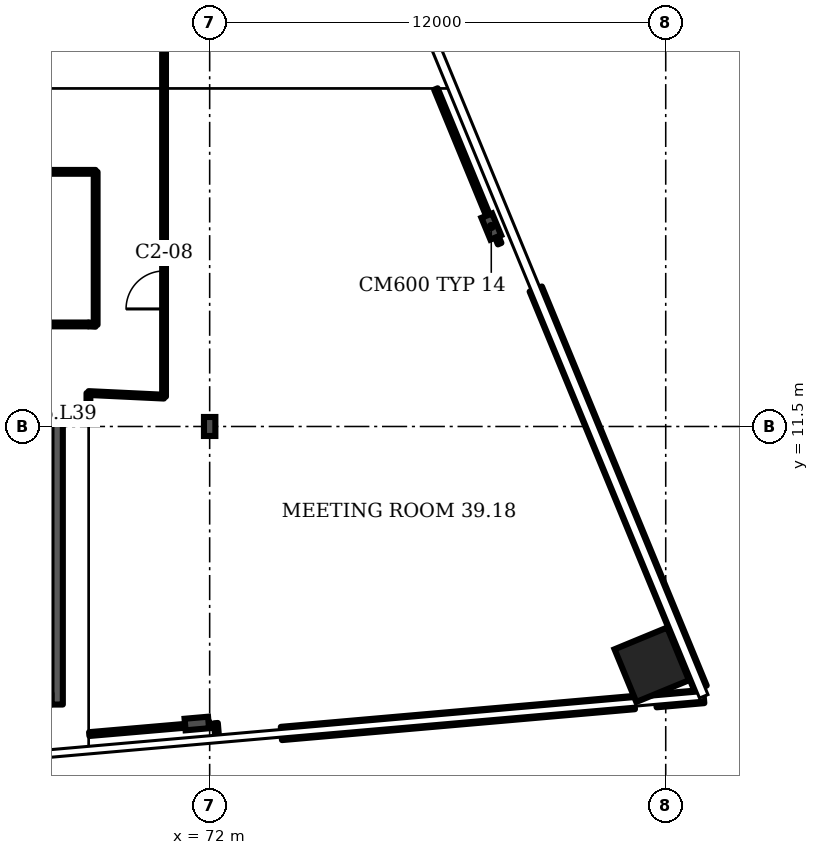
"""IFC4 building model, lengths in metres.
Left out: names, types, materials, properties, quantities, classifications, styles, units other than length and angle.
Written with IfcOpenShell. Run it as: python <this file> out.ifc"""

import sys

from ifc_helpers import new_model, si_unit, direction, frame, frame_2d, origin, origin_2d, place, context, subcontext, project, spatial, rectangle, i_section, extrude, element, fill, save


model = new_model("IFC4")
c1 = context("Model", 3, precision=1e-05, world=origin(), true_north=direction((0.0, 1.0)))
c2 = subcontext(c1, "Body", "Model", "MODEL_VIEW")
j1 = project(units=[si_unit("LENGTHUNIT", "METRE"), si_unit("PLANEANGLEUNIT", "RADIAN")], contexts=[c1])
p1 = place(None, origin())
s1 = spatial("IfcSite", under=j1, at=p1, CompositionType="ELEMENT")
p2 = place(p1, origin())
s2 = spatial("IfcBuilding", under=s1, at=p2, CompositionType="ELEMENT")
p3 = place(p2, frame((0.0, 0.0, 162.7)))
s3 = spatial("IfcBuildingStorey", under=s2, at=p3, CompositionType="ELEMENT", Elevation=162.7)
p4 = place(p3, frame((83.633, 5.231, 0.0), z_axis=(0.0, 0.0, 1.0), x_axis=(-0.381602, 0.924325, 0.0)))
e1 = element("IfcColumn", 1, at=p4, inside=s3, PredefinedType="COLUMN", context=c2, shape_type="SweptSolid", body=[
    extrude(rectangle(XDim=1.5, YDim=1.5, at=origin_2d()), origin(), (0.0, 0.0, 1.0), 3.6),
])
for number, where, z_axis, x_axis in (
    (2, (71.662, 3.685, 0.0), (0.0, 0.0, 1.0), (0.087, -0.996, 0.0)),
    (3, (79.41, 16.762, 0.0), (0.0, 0.0, 1.0), (0.924, 0.382, 0.0)),
):
    element("IfcColumn", number, at=place(p3, frame(where, z_axis=z_axis, x_axis=x_axis)), inside=s3, PredefinedType="COLUMN", context=c2, shape_type="SweptSolid", body=[
        extrude(i_section(OverallWidth=0.305, OverallDepth=0.62, WebThickness=0.021, FlangeThickness=0.04, FilletRadius=0.027, at=origin_2d()), origin(), (0.0, 0.0, 1.0), 3.6),
    ])
p5 = place(p3, frame((72.0, 11.5, 0.0), z_axis=(0.0, 0.0, 1.0), x_axis=(1.0, 0.0, 0.0)))
e4 = element("IfcColumn", 4, at=p5, inside=s3, PredefinedType="COLUMN", context=c2, shape_type="SweptSolid", body=[
    extrude(i_section(OverallWidth=0.3, OverallDepth=0.5, WebThickness=0.014, FlangeThickness=0.028, FilletRadius=0.027, at=origin_2d()), origin(), (0.0, 0.0, 1.0), 3.6),
])
p6 = place(p3, frame((73.887, 3.423, 0.0), z_axis=(0.0, 0.0, 1.0), x_axis=(0.996197, 0.087145, 0.0)))
e5 = element("IfcWall", 5, at=p6, inside=s3, PredefinedType="SOLIDWALL", context=c2, shape_type="SweptSolid", body=[
    extrude(rectangle(XDim=9.323, YDim=0.35, at=frame_2d((4.662, 0.0))), origin(), (0.0, 0.0, 1.0), 1.0),
])
p7 = place(p3, frame((83.745, 4.285, 0.0), z_axis=(0.0, 0.0, 1.0), x_axis=(0.996198, 0.087148, 0.0)))
e6 = element("IfcWall", 6, at=p7, inside=s3, PredefinedType="SOLIDWALL", context=c2, shape_type="SweptSolid", body=[
    extrude(rectangle(XDim=1.261, YDim=0.35, at=frame_2d((0.63, 0.0))), origin(), (0.0, 0.0, 1.0), 1.0),
])
p8 = place(p3, frame((84.916, 4.616, 0.0), z_axis=(0.0, 0.0, 1.0), x_axis=(-0.381598, 0.924328, 0.0)))
e7 = element("IfcWall", 7, at=p8, inside=s3, PredefinedType="SOLIDWALL", context=c2, shape_type="SweptSolid", body=[
    extrude(rectangle(XDim=11.361, YDim=0.35, at=frame_2d((5.68, 0.0))), origin(), (0.0, 0.0, 1.0), 1.0),
])
p9 = place(p3, frame((63.786, 11.834, 0.0), z_axis=(0.0, 0.0, 1.0), x_axis=(1.0, 0.0, 0.0)))
e8 = element("IfcWall", 8, at=p9, inside=s3, PredefinedType="SHEAR", context=c2, shape_type="SweptSolid", body=[
    extrude(rectangle(XDim=4.35, YDim=0.3, at=frame_2d((2.175, 0.0))), origin(), (0.0, 0.0, 1.0), 3.2),
])
p10 = place(p9, frame((1.575, 0.0, 0.0)))
e9 = element("IfcOpeningElement", 9, at=p10, cuts=e8, PredefinedType="OPENING", context=c2, shape_type="SweptSolid", body=[
    extrude(rectangle(XDim=1.2, YDim=2.1, at=frame_2d((0.6, 1.05))), frame((0.0, 0.16, 0.0), z_axis=(0.0, -1.0, 0.0), x_axis=(1.0, 0.0, 0.0)), (0.0, 0.0, 1.0), 0.32),
])
p11 = place(p3, frame((61.81, 14.185, 0.0), z_axis=(0.0, 0.0, 1.0), x_axis=(1.0, 0.0, 0.0)))
e10 = element("IfcWall", 10, at=p11, inside=s3, PredefinedType="PARTITIONING", context=c2, shape_type="SweptSolid", body=[
    extrude(rectangle(XDim=7.0, YDim=0.1, at=frame_2d((3.5, 0.0))), origin(), (0.0, 0.0, 1.0), 3.2),
])
p12 = place(p3, frame((63.905, 18.2, 0.0), z_axis=(0.0, 0.0, 1.0), x_axis=(1.0, 0.0, 0.0)))
e11 = element("IfcWall", 11, at=p12, inside=s3, PredefinedType="PARTITIONING", context=c2, shape_type="SweptSolid", body=[
    extrude(rectangle(XDim=5.095, YDim=0.1, at=frame_2d((2.547, 0.0))), origin(), (0.0, 0.0, 1.0), 3.2),
])
p13 = place(p3, frame((68.81, 12.004, 0.0), z_axis=(0.0, 0.0, 1.0), x_axis=(0.0, 1.0, 0.0)))
e12 = element("IfcWall", 12, at=p13, inside=s3, PredefinedType="PARTITIONING", context=c2, shape_type="SweptSolid", body=[
    extrude(rectangle(XDim=0.376, YDim=0.1, at=frame_2d((0.188, 0.0))), origin(), (0.0, 0.0, 1.0), 3.2),
])
p14 = place(p3, frame((68.831, 3.407, 0.0), z_axis=(0.0, 0.0, 1.0), x_axis=(0.996308, 0.085898, 0.0)))
e13 = element("IfcWall", 13, at=p14, inside=s3, PredefinedType="PARTITIONING", context=c2, shape_type="SweptSolid", body=[
    extrude(rectangle(XDim=3.18, YDim=0.1, at=frame_2d((1.59, 0.0))), origin(), (0.0, 0.0, 1.0), 2.58),
])
p15 = place(p3, frame((69.0, 14.175, 0.0), z_axis=(0.0, 0.0, 1.0), x_axis=(-0.99861, 0.052626, 0.0)))
e14 = element("IfcWall", 14, at=p15, inside=s3, PredefinedType="PARTITIONING", context=c2, shape_type="SweptSolid", body=[
    extrude(rectangle(XDim=0.19, YDim=0.1, at=frame_2d((0.095, 0.0))), origin(), (0.0, 0.0, 1.0), 3.2),
])
p16 = place(p3, frame((69.0, 14.175, 0.0), z_axis=(0.0, 0.0, 1.0), x_axis=(0.0, 1.0, 0.0)))
e15 = element("IfcWall", 15, at=p16, inside=s3, PredefinedType="PARTITIONING", context=c2, shape_type="SweptSolid", body=[
    extrude(rectangle(XDim=4.025, YDim=0.1, at=frame_2d((2.012, 0.0))), origin(), (0.0, 0.0, 1.0), 3.2),
])
p17 = place(p3, frame((70.8, 12.285, 0.0), z_axis=(0.0, 0.0, 1.0), x_axis=(-0.998864, 0.04767, 0.0)))
e16 = element("IfcWall", 16, at=p17, inside=s3, PredefinedType="PARTITIONING", context=c2, shape_type="SweptSolid", body=[
    extrude(rectangle(XDim=1.992, YDim=0.1, at=frame_2d((0.996, 0.0))), origin(), (0.0, 0.0, 1.0), 3.2),
])
p18 = place(p3, frame((70.8, 12.285, 0.0), z_axis=(0.0, 0.0, 1.0), x_axis=(0.0, 1.0, 0.0)))
e17 = element("IfcWall", 17, at=p18, inside=s3, PredefinedType="PARTITIONING", context=c2, shape_type="SweptSolid", body=[
    extrude(rectangle(XDim=9.44, YDim=0.1, at=frame_2d((4.72, 0.0))), origin(), (0.0, 0.0, 1.0), 3.2),
])
p19 = place(p18, frame((2.308, 0.0, 0.0)))
e18 = element("IfcOpeningElement", 18, at=p19, cuts=e17, PredefinedType="OPENING", context=c2, shape_type="SweptSolid", body=[
    extrude(rectangle(XDim=1.0, YDim=2.1, at=frame_2d((0.5, 1.05))), frame((0.0, 0.06, 0.0), z_axis=(0.0, -1.0, 0.0), x_axis=(1.0, 0.0, 0.0)), (0.0, 0.0, 1.0), 0.12),
])
p20 = place(p3, frame((72.198, 3.3, 0.0), z_axis=(0.0, 0.0, 1.0), x_axis=(-0.083759, 0.996486, 0.0)))
e19 = element("IfcWall", 19, at=p20, inside=s3, PredefinedType="PARTITIONING", context=c2, shape_type="SweptSolid", body=[
    extrude(rectangle(XDim=0.396, YDim=0.1, at=frame_2d((0.198, 0.0))), origin(), (0.0, 0.0, 1.0), 3.2),
])
p21 = place(p3, frame((79.63, 16.31, 0.0), z_axis=(0.0, 0.0, 1.0), x_axis=(-0.380933, 0.9246, 0.0)))
e20 = element("IfcWall", 20, at=p21, inside=s3, PredefinedType="PARTITIONING", context=c2, shape_type="SweptSolid", body=[
    extrude(rectangle(XDim=4.402, YDim=0.1, at=frame_2d((2.201, 0.0))), origin(), (0.0, 0.0, 1.0), 2.58),
])
p22 = place(p3, frame((67.986, 4.184, 0.0), z_axis=(0.0, 0.0, 1.0), x_axis=(0.0, 1.0, 0.0)))
e21 = element("IfcWall", 21, at=p22, inside=s3, PredefinedType="SHEAR", context=c2, shape_type="SweptSolid", body=[
    extrude(rectangle(XDim=7.5, YDim=0.3, at=frame_2d((3.75, 0.0))), origin(), (0.0, 0.0, 1.0), 3.2),
])
p23 = place(p19, origin())
e22 = element("IfcDoor", 22, at=p23, inside=s3, OperationType="SINGLE_SWING_LEFT", PredefinedType="DOOR", context=c2, shape_type="SweptSolid", body=[
    extrude(rectangle(XDim=1.0, YDim=2.1, at=frame_2d((0.5, 1.05))), frame((0.0, 0.025, 0.0), z_axis=(0.0, -1.0, 0.0), x_axis=(1.0, 0.0, 0.0)), (0.0, 0.0, 1.0), 0.05),
])
fill(e18, e22)
save(model, sys.argv[1])
